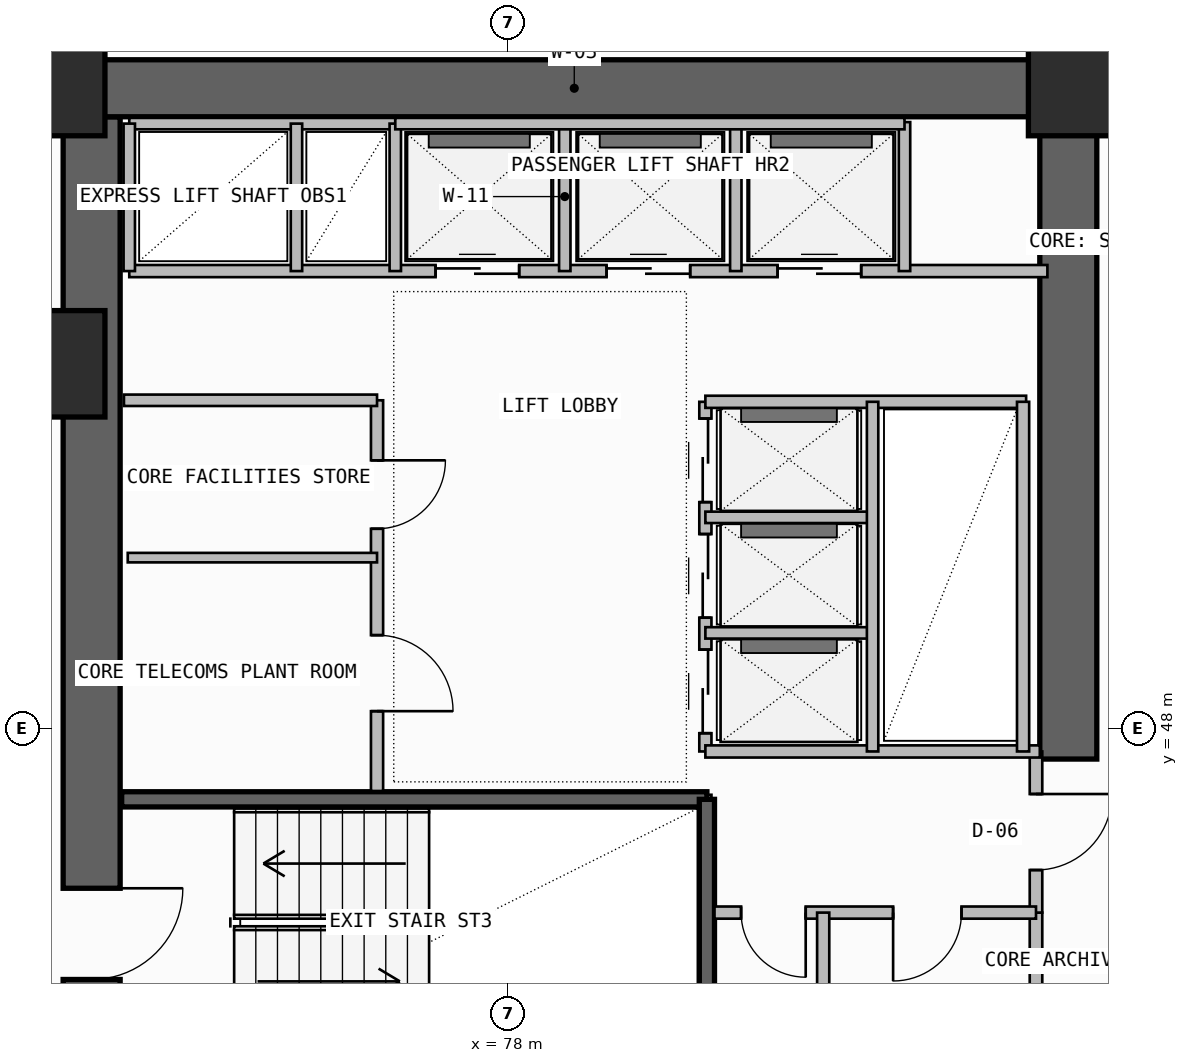
"""IFC4 building model, lengths in metres.
Left out: names, types, materials, properties, quantities, classifications, styles, units other than length and angle.
Written with IfcOpenShell. Run it as: python <this file> out.ifc"""

import sys

from ifc_helpers import new_model, si_unit, direction, frame, frame_2d, origin, origin_2d, place, context, subcontext, project, spatial, rectangle, extrude, element, fill, save


model = new_model("IFC4")
c1 = context("Model", 3, precision=1e-05, world=origin(), true_north=direction((0.0, 1.0)))
c2 = subcontext(c1, "Body", "Model", "MODEL_VIEW")
j1 = project(units=[si_unit("LENGTHUNIT", "METRE"), si_unit("PLANEANGLEUNIT", "RADIAN")], contexts=[c1])
p1 = place(None, origin())
s1 = spatial("IfcSite", under=j1, at=p1, CompositionType="ELEMENT")
p2 = place(p1, origin())
s2 = spatial("IfcBuilding", under=s1, at=p2, CompositionType="ELEMENT")
p3 = place(p2, frame((0.0, 0.0, 193.18)))
s3 = spatial("IfcBuildingStorey", under=s2, at=p3, CompositionType="ELEMENT", Elevation=193.18)
p4 = place(p3, frame((72.525, 43.35, -0.26), z_axis=(0.0, 0.0, 1.0), x_axis=(0.0, 1.0, 0.0)))
e1 = element("IfcWall", 1, at=p4, inside=s3, PredefinedType="SHEAR", context=c2, shape_type="SweptSolid", body=[
    extrude(rectangle(XDim=12.7, YDim=0.75, at=frame_2d((6.35, 0.0))), origin(), (0.0, 0.0, 1.0), 3.28),
])
p5 = place(p4, frame((1.35, 0.0, 0.26)))
e2 = element("IfcOpeningElement", 2, at=p5, cuts=e1, PredefinedType="OPENING", context=c2, shape_type="SweptSolid", body=[
    extrude(rectangle(XDim=1.2, YDim=2.2, at=frame_2d((0.6, 1.1))), frame((0.0, 0.385, 0.0), z_axis=(0.0, -1.0, 0.0), x_axis=(1.0, 0.0, 0.0)), (0.0, 0.0, 1.0), 0.77),
])
p6 = place(p3, frame((72.0, 56.425, -0.26), z_axis=(0.0, 0.0, 1.0), x_axis=(1.0, 0.0, 0.0)))
e3 = element("IfcWall", 3, at=p6, inside=s3, PredefinedType="SHEAR", context=c2, shape_type="SweptSolid", body=[
    extrude(rectangle(XDim=13.75, YDim=0.75, at=frame_2d((6.875, 0.0))), origin(), (0.0, 0.0, 1.0), 3.28),
])
p7 = place(p3, frame((85.375, 47.6, -0.26), z_axis=(0.0, 0.0, 1.0), x_axis=(0.0, 1.0, 0.0)))
e4 = element("IfcWall", 4, at=p7, inside=s3, PredefinedType="SHEAR", context=c2, shape_type="SweptSolid", body=[
    extrude(rectangle(XDim=8.45, YDim=0.75, at=frame_2d((4.225, 0.0))), origin(), (0.0, 0.0, 1.0), 3.28),
])
for number, where, z_axis, x_axis in (
    (5, (72.0, 52.8, 0.0), (0.0, 0.0, 1.0), (1.0, 0.0, 0.0)),
    (6, (72.0, 56.5, 0.0), (0.0, 0.0, 1.0), (1.0, 0.0, 0.0)),
    (7, (85.55, 56.5, 0.0), (0.0, 0.0, 1.0), (1.0, 0.0, 0.0)),
):
    element("IfcColumn", number, at=place(p3, frame(where, z_axis=z_axis, x_axis=x_axis)), inside=s3, PredefinedType="COLUMN", context=c2, shape_type="SweptSolid", body=[
        extrude(rectangle(XDim=1.4, YDim=1.4, at=origin_2d()), origin(), (0.0, 0.0, 1.0), 3.52),
    ])
p8 = place(p3, frame((72.92, 47.07, -0.26), z_axis=(0.0, 0.0, 1.0), x_axis=(1.0, 0.0, 0.0)))
e8 = element("IfcWall", 8, at=p8, inside=s3, PredefinedType="SOLIDWALL", context=c2, shape_type="SweptSolid", body=[
    extrude(rectangle(XDim=7.7, YDim=0.2, at=frame_2d((3.85, 0.0))), origin(), (0.0, 0.0, 1.0), 3.28),
])
p9 = place(p3, frame((80.62, 43.83, -0.26), z_axis=(0.0, 0.0, 1.0), x_axis=(0.0, 1.0, 0.0)))
e9 = element("IfcWall", 9, at=p9, inside=s3, PredefinedType="SOLIDWALL", context=c2, shape_type="SweptSolid", body=[
    extrude(rectangle(XDim=3.24, YDim=0.2, at=frame_2d((1.62, 0.0))), origin(), (0.0, 0.0, 1.0), 3.28),
])
p10 = place(p3, frame((84.95, 43.68, 0.0), z_axis=(0.0, 0.0, 1.0), x_axis=(0.0, 1.0, 0.0)))
e10 = element("IfcWall", 10, at=p10, inside=s3, PredefinedType="PLUMBINGWALL", context=c2, shape_type="SweptSolid", body=[
    extrude(rectangle(XDim=1.9, YDim=0.165, at=frame_2d((0.95, 0.0))), origin(), (0.0, 0.0, 1.0), 3.02),
])
p11 = place(p3, frame((84.95, 45.58, 0.0), z_axis=(0.0, 0.0, 1.0), x_axis=(0.0, 1.0, 0.0)))
e11 = element("IfcWall", 11, at=p11, inside=s3, PredefinedType="PARTITIONING", context=c2, shape_type="SweptSolid", body=[
    extrude(rectangle(XDim=2.12, YDim=0.165, at=frame_2d((1.06, 0.0))), origin(), (0.0, 0.0, 1.0), 3.02),
])
p12 = place(p11, frame((0.56, 0.0, 0.0)))
e12 = element("IfcOpeningElement", 12, at=p12, cuts=e11, PredefinedType="OPENING", context=c2, shape_type="SweptSolid", body=[
    extrude(rectangle(XDim=1.0, YDim=2.2, at=frame_2d((0.5, 1.1))), frame((0.0, 0.093, 0.0), z_axis=(0.0, -1.0, 0.0), x_axis=(1.0, 0.0, 0.0)), (0.0, 0.0, 1.0), 0.185),
])
p13 = place(p3, frame((80.72, 45.58, 0.0), z_axis=(0.0, 0.0, 1.0), x_axis=(1.0, 0.0, 0.0)))
e13 = element("IfcWall", 13, at=p13, inside=s3, PredefinedType="PLUMBINGWALL", context=c2, shape_type="SweptSolid", body=[
    extrude(rectangle(XDim=4.23, YDim=0.16, at=frame_2d((2.115, 0.0))), origin(), (0.0, 0.0, 1.0), 3.02),
])
p14 = place(p13, frame((0.35, 0.0, 0.0)))
e14 = element("IfcOpeningElement", 14, at=p14, cuts=e13, PredefinedType="OPENING", context=c2, shape_type="SweptSolid", body=[
    extrude(rectangle(XDim=0.85, YDim=2.05, at=frame_2d((0.425, 1.025))), frame((0.0, 0.09, 0.0), z_axis=(0.0, -1.0, 0.0), x_axis=(1.0, 0.0, 0.0)), (0.0, 0.0, 1.0), 0.18),
])
p15 = place(p13, frame((2.35, 0.0, 0.0)))
e15 = element("IfcOpeningElement", 15, at=p15, cuts=e13, PredefinedType="OPENING", context=c2, shape_type="SweptSolid", body=[
    extrude(rectangle(XDim=0.9, YDim=2.1, at=frame_2d((0.45, 1.05))), frame((0.0, 0.09, 0.0), z_axis=(0.0, -1.0, 0.0), x_axis=(1.0, 0.0, 0.0)), (0.0, 0.0, 1.0), 0.18),
])
p16 = place(p3, frame((82.15, 43.68, 0.0), z_axis=(0.0, 0.0, 1.0), x_axis=(0.0, 1.0, 0.0)))
e16 = element("IfcWall", 16, at=p16, inside=s3, PredefinedType="PLUMBINGWALL", context=c2, shape_type="SweptSolid", body=[
    extrude(rectangle(XDim=1.9, YDim=0.16, at=frame_2d((0.95, 0.0))), origin(), (0.0, 0.0, 1.0), 3.02),
])
p17 = place(p3, frame((76.28, 47.18, 0.0), z_axis=(0.0, 0.0, 1.0), x_axis=(0.0, 1.0, 0.0)))
e17 = element("IfcWall", 17, at=p17, inside=s3, PredefinedType="SOLIDWALL", context=c2, shape_type="SweptSolid", body=[
    extrude(rectangle(XDim=5.14, YDim=0.16, at=frame_2d((2.57, 0.0))), origin(), (0.0, 0.0, 1.0), 3.02),
])
p18 = place(p17, frame((1.05, 0.0, 0.0)))
e18 = element("IfcOpeningElement", 18, at=p18, cuts=e17, PredefinedType="OPENING", context=c2, shape_type="SweptSolid", body=[
    extrude(rectangle(XDim=1.0, YDim=2.2, at=frame_2d((0.5, 1.1))), frame((0.0, 0.09, 0.0), z_axis=(0.0, -1.0, 0.0), x_axis=(1.0, 0.0, 0.0)), (0.0, 0.0, 1.0), 0.18),
])
p19 = place(p17, frame((3.45, 0.0, 0.0)))
e19 = element("IfcOpeningElement", 19, at=p19, cuts=e17, PredefinedType="OPENING", context=c2, shape_type="SweptSolid", body=[
    extrude(rectangle(XDim=0.9, YDim=2.1, at=frame_2d((0.45, 1.05))), frame((0.0, 0.09, 0.0), z_axis=(0.0, -1.0, 0.0), x_axis=(1.0, 0.0, 0.0)), (0.0, 0.0, 1.0), 0.18),
])
p20 = place(p3, frame((72.95, 52.32, 0.0), z_axis=(0.0, 0.0, 1.0), x_axis=(1.0, 0.0, 0.0)))
e20 = element("IfcWall", 20, at=p20, inside=s3, PredefinedType="SOLIDWALL", context=c2, shape_type="SweptSolid", body=[
    extrude(rectangle(XDim=3.33, YDim=0.15, at=frame_2d((1.665, 0.0))), origin(), (0.0, 0.0, 1.0), 3.02),
])
p21 = place(p3, frame((73.0, 50.25, 0.0), z_axis=(0.0, 0.0, 1.0), x_axis=(1.0, 0.0, 0.0)))
e21 = element("IfcWall", 21, at=p21, inside=s3, PredefinedType="PARTITIONING", context=c2, shape_type="SweptSolid", body=[
    extrude(rectangle(XDim=3.28, YDim=0.125, at=frame_2d((1.64, 0.0))), origin(), (0.0, 0.0, 1.0), 3.02),
])
p22 = place(p3, frame((80.6, 47.7, 0.0), z_axis=(0.0, 0.0, 1.0), x_axis=(0.0, 1.0, 0.0)))
e22 = element("IfcWall", 22, at=p22, inside=s3, PredefinedType="SOLIDWALL", context=c2, shape_type="SweptSolid", body=[
    extrude(rectangle(XDim=4.6, YDim=0.16, at=frame_2d((2.3, 0.0))), origin(), (0.0, 0.0, 1.0), 3.02),
])
p23 = place(p22, frame((0.24, 0.0, 0.0)))
e23 = element("IfcOpeningElement", 23, at=p23, cuts=e22, PredefinedType="OPENING", context=c2, shape_type="SweptSolid", body=[
    extrude(rectangle(XDim=1.1, YDim=2.25, at=frame_2d((0.55, 1.125))), frame((0.0, 0.09, 0.0), z_axis=(0.0, -1.0, 0.0), x_axis=(1.0, 0.0, 0.0)), (0.0, 0.0, 1.0), 0.18),
])
p24 = place(p22, frame((1.76, 0.0, 0.0)))
e24 = element("IfcOpeningElement", 24, at=p24, cuts=e22, PredefinedType="OPENING", context=c2, shape_type="SweptSolid", body=[
    extrude(rectangle(XDim=1.1, YDim=2.25, at=frame_2d((0.55, 1.125))), frame((0.0, 0.09, 0.0), z_axis=(0.0, -1.0, 0.0), x_axis=(1.0, 0.0, 0.0)), (0.0, 0.0, 1.0), 0.18),
])
p25 = place(p22, frame((3.28, 0.0, 0.0)))
e25 = element("IfcOpeningElement", 25, at=p25, cuts=e22, PredefinedType="OPENING", context=c2, shape_type="SweptSolid", body=[
    extrude(rectangle(XDim=1.1, YDim=2.25, at=frame_2d((0.55, 1.125))), frame((0.0, 0.09, 0.0), z_axis=(0.0, -1.0, 0.0), x_axis=(1.0, 0.0, 0.0)), (0.0, 0.0, 1.0), 0.18),
])
p26 = place(p3, frame((80.6, 47.7, 0.0), z_axis=(0.0, 0.0, 1.0), x_axis=(1.0, 0.0, 0.0)))
e26 = element("IfcWall", 26, at=p26, inside=s3, PredefinedType="SOLIDWALL", context=c2, shape_type="SweptSolid", body=[
    extrude(rectangle(XDim=4.4, YDim=0.16, at=frame_2d((2.2, 0.0))), origin(), (0.0, 0.0, 1.0), 3.02),
])
p27 = place(p3, frame((80.6, 52.3, 0.0), z_axis=(0.0, 0.0, 1.0), x_axis=(1.0, 0.0, 0.0)))
e27 = element("IfcWall", 27, at=p27, inside=s3, PredefinedType="SOLIDWALL", context=c2, shape_type="SweptSolid", body=[
    extrude(rectangle(XDim=4.22, YDim=0.16, at=frame_2d((2.11, 0.0))), origin(), (0.0, 0.0, 1.0), 3.02),
])
for number, where, z_axis, x_axis in (
    (28, (80.6, 49.26, 0.0), (0.0, 0.0, 1.0), (1.0, 0.0, 0.0)),
    (29, (80.6, 50.78, 0.0), (0.0, 0.0, 1.0), (1.0, 0.0, 0.0)),
):
    element("IfcWall", number, at=place(p3, frame(where, z_axis=z_axis, x_axis=x_axis)), inside=s3, PredefinedType="PLUMBINGWALL", context=c2, shape_type="SweptSolid", body=[
        extrude(rectangle(XDim=2.2, YDim=0.15, at=frame_2d((1.1, 0.0))), origin(), (0.0, 0.0, 1.0), 3.02),
    ])
p28 = place(p3, frame((82.8, 47.7, 0.0), z_axis=(0.0, 0.0, 1.0), x_axis=(0.0, 1.0, 0.0)))
e30 = element("IfcWall", 30, at=p28, inside=s3, PredefinedType="PLUMBINGWALL", context=c2, shape_type="SweptSolid", body=[
    extrude(rectangle(XDim=4.6, YDim=0.15, at=frame_2d((2.3, 0.0))), origin(), (0.0, 0.0, 1.0), 3.02),
])
p29 = place(p3, frame((84.78, 47.7, 0.0), z_axis=(0.0, 0.0, 1.0), x_axis=(0.0, 1.0, 0.0)))
e31 = element("IfcWall", 31, at=p29, inside=s3, PredefinedType="SOLIDWALL", context=c2, shape_type="SweptSolid", body=[
    extrude(rectangle(XDim=4.6, YDim=0.16, at=frame_2d((2.3, 0.0))), origin(), (0.0, 0.0, 1.0), 3.02),
])
p30 = place(p3, frame((73.02, 54.02, 0.0), z_axis=(0.0, 0.0, 1.0), x_axis=(1.0, 0.0, 0.0)))
e32 = element("IfcWall", 32, at=p30, inside=s3, PredefinedType="SOLIDWALL", context=c2, shape_type="SweptSolid", body=[
    extrude(rectangle(XDim=12.08, YDim=0.16, at=frame_2d((6.04, 0.0))), origin(), (0.0, 0.0, 1.0), 3.02),
])
p31 = place(p30, frame((4.03, 0.0, 0.0)))
e33 = element("IfcOpeningElement", 33, at=p31, cuts=e32, PredefinedType="OPENING", context=c2, shape_type="SweptSolid", body=[
    extrude(rectangle(XDim=1.1, YDim=2.25, at=frame_2d((0.55, 1.125))), frame((0.0, 0.09, 0.0), z_axis=(0.0, -1.0, 0.0), x_axis=(1.0, 0.0, 0.0)), (0.0, 0.0, 1.0), 0.18),
])
p32 = place(p30, frame((6.28, 0.0, 0.0)))
e34 = element("IfcOpeningElement", 34, at=p32, cuts=e32, PredefinedType="OPENING", context=c2, shape_type="SweptSolid", body=[
    extrude(rectangle(XDim=1.1, YDim=2.25, at=frame_2d((0.55, 1.125))), frame((0.0, 0.09, 0.0), z_axis=(0.0, -1.0, 0.0), x_axis=(1.0, 0.0, 0.0)), (0.0, 0.0, 1.0), 0.18),
])
p33 = place(p30, frame((8.53, 0.0, 0.0)))
e35 = element("IfcOpeningElement", 35, at=p33, cuts=e32, PredefinedType="OPENING", context=c2, shape_type="SweptSolid", body=[
    extrude(rectangle(XDim=1.1, YDim=2.25, at=frame_2d((0.55, 1.125))), frame((0.0, 0.09, 0.0), z_axis=(0.0, -1.0, 0.0), x_axis=(1.0, 0.0, 0.0)), (0.0, 0.0, 1.0), 0.18),
])
p34 = place(p3, frame((73.02, 55.96, 0.0), z_axis=(0.0, 0.0, 1.0), x_axis=(1.0, 0.0, 0.0)))
e36 = element("IfcWall", 36, at=p34, inside=s3, PredefinedType="SOLIDWALL", context=c2, shape_type="SweptSolid", body=[
    extrude(rectangle(XDim=3.5, YDim=0.15, at=frame_2d((1.75, 0.0))), origin(), (0.0, 0.0, 1.0), 3.02),
])
p35 = place(p3, frame((73.02, 54.02, 0.0), z_axis=(0.0, 0.0, 1.0), x_axis=(0.0, 1.0, 0.0)))
e37 = element("IfcWall", 37, at=p35, inside=s3, PredefinedType="PLUMBINGWALL", context=c2, shape_type="SweptSolid", body=[
    extrude(rectangle(XDim=1.94, YDim=0.15, at=frame_2d((0.97, 0.0))), origin(), (0.0, 0.0, 1.0), 3.02),
])
p36 = place(p3, frame((76.52, 54.02, 0.0), z_axis=(0.0, 0.0, 1.0), x_axis=(0.0, 1.0, 0.0)))
e38 = element("IfcWall", 38, at=p36, inside=s3, PredefinedType="SOLIDWALL", context=c2, shape_type="SweptSolid", body=[
    extrude(rectangle(XDim=1.94, YDim=0.15, at=frame_2d((0.97, 0.0))), origin(), (0.0, 0.0, 1.0), 3.02),
])
p37 = place(p3, frame((75.22, 54.02, 0.0), z_axis=(0.0, 0.0, 1.0), x_axis=(0.0, 1.0, 0.0)))
e39 = element("IfcWall", 39, at=p37, inside=s3, PredefinedType="PLUMBINGWALL", context=c2, shape_type="SweptSolid", body=[
    extrude(rectangle(XDim=1.94, YDim=0.15, at=frame_2d((0.97, 0.0))), origin(), (0.0, 0.0, 1.0), 3.02),
])
for number, where, z_axis, x_axis in (
    (40, (78.75, 54.02, 0.0), (0.0, 0.0, 1.0), (0.0, 1.0, 0.0)),
    (41, (81.0, 54.02, 0.0), (0.0, 0.0, 1.0), (0.0, 1.0, 0.0)),
):
    element("IfcWall", number, at=place(p3, frame(where, z_axis=z_axis, x_axis=x_axis)), inside=s3, PredefinedType="PLUMBINGWALL", context=c2, shape_type="SweptSolid", body=[
        extrude(rectangle(XDim=1.96, YDim=0.15, at=frame_2d((0.98, 0.0))), origin(), (0.0, 0.0, 1.0), 3.02),
    ])
p38 = place(p3, frame((83.22, 54.02, 0.0), z_axis=(0.0, 0.0, 1.0), x_axis=(0.0, 1.0, 0.0)))
e42 = element("IfcWall", 42, at=p38, inside=s3, PredefinedType="SOLIDWALL", context=c2, shape_type="SweptSolid", body=[
    extrude(rectangle(XDim=1.96, YDim=0.15, at=frame_2d((0.98, 0.0))), origin(), (0.0, 0.0, 1.0), 3.02),
])
p39 = place(p3, frame((76.52, 55.96, 0.0), z_axis=(0.0, 0.0, 1.0), x_axis=(1.0, 0.0, 0.0)))
e43 = element("IfcWall", 43, at=p39, inside=s3, PredefinedType="SOLIDWALL", context=c2, shape_type="SweptSolid", body=[
    extrude(rectangle(XDim=6.7, YDim=0.15, at=frame_2d((3.35, 0.0))), origin(), (0.0, 0.0, 1.0), 3.02),
])
p40 = place(p5, frame((1.2, 0.0, 0.0), z_axis=(0.0, 0.0, 1.0), x_axis=(-1.0, 0.0, 0.0)))
e44 = element("IfcDoor", 44, at=p40, inside=s3, OperationType="SINGLE_SWING_LEFT", PredefinedType="USERDEFINED", context=c2, shape_type="SweptSolid", body=[
    extrude(rectangle(XDim=1.2, YDim=2.2, at=frame_2d((0.6, 1.1))), frame((0.0, 0.025, 0.0), z_axis=(0.0, -1.0, 0.0), x_axis=(1.0, 0.0, 0.0)), (0.0, 0.0, 1.0), 0.05),
])
fill(e2, e44)
p41 = place(p12, frame((1.0, 0.0, 0.0), z_axis=(0.0, 0.0, 1.0), x_axis=(-1.0, 0.0, 0.0)))
e45 = element("IfcDoor", 45, at=p41, inside=s3, OperationType="SINGLE_SWING_LEFT", PredefinedType="DOOR", context=c2, shape_type="SweptSolid", body=[
    extrude(rectangle(XDim=1.0, YDim=2.2, at=frame_2d((0.5, 1.1))), frame((0.0, 0.025, 0.0), z_axis=(0.0, -1.0, 0.0), x_axis=(1.0, 0.0, 0.0)), (0.0, 0.0, 1.0), 0.05),
])
fill(e12, e45)
p42 = place(p14, frame((0.85, 0.0, 0.0), z_axis=(0.0, 0.0, 1.0), x_axis=(-1.0, 0.0, 0.0)))
e46 = element("IfcDoor", 46, at=p42, inside=s3, OperationType="SINGLE_SWING_LEFT", PredefinedType="DOOR", context=c2, shape_type="SweptSolid", body=[
    extrude(rectangle(XDim=0.85, YDim=2.05, at=frame_2d((0.425, 1.025))), frame((0.0, 0.025, 0.0), z_axis=(0.0, -1.0, 0.0), x_axis=(1.0, 0.0, 0.0)), (0.0, 0.0, 1.0), 0.05),
])
fill(e14, e46)
p43 = place(p15, frame((0.9, 0.0, 0.0), z_axis=(0.0, 0.0, 1.0), x_axis=(-1.0, 0.0, 0.0)))
e47 = element("IfcDoor", 47, at=p43, inside=s3, OperationType="SINGLE_SWING_RIGHT", PredefinedType="DOOR", context=c2, shape_type="SweptSolid", body=[
    extrude(rectangle(XDim=0.9, YDim=2.1, at=frame_2d((0.45, 1.05))), frame((0.0, 0.025, 0.0), z_axis=(0.0, -1.0, 0.0), x_axis=(1.0, 0.0, 0.0)), (0.0, 0.0, 1.0), 0.05),
])
fill(e15, e47)
p44 = place(p18, frame((1.0, 0.0, 0.0), z_axis=(0.0, 0.0, 1.0), x_axis=(-1.0, 0.0, 0.0)))
e48 = element("IfcDoor", 48, at=p44, inside=s3, OperationType="SINGLE_SWING_RIGHT", PredefinedType="DOOR", context=c2, shape_type="SweptSolid", body=[
    extrude(rectangle(XDim=1.0, YDim=2.2, at=frame_2d((0.5, 1.1))), frame((0.0, 0.025, 0.0), z_axis=(0.0, -1.0, 0.0), x_axis=(1.0, 0.0, 0.0)), (0.0, 0.0, 1.0), 0.05),
])
fill(e18, e48)
p45 = place(p19, frame((0.9, 0.0, 0.0), z_axis=(0.0, 0.0, 1.0), x_axis=(-1.0, 0.0, 0.0)))
e49 = element("IfcDoor", 49, at=p45, inside=s3, OperationType="SINGLE_SWING_LEFT", PredefinedType="DOOR", context=c2, shape_type="SweptSolid", body=[
    extrude(rectangle(XDim=0.9, YDim=2.1, at=frame_2d((0.45, 1.05))), frame((0.0, 0.025, 0.0), z_axis=(0.0, -1.0, 0.0), x_axis=(1.0, 0.0, 0.0)), (0.0, 0.0, 1.0), 0.05),
])
fill(e19, e49)
p46 = place(p23, frame((1.1, 0.0, 0.0), z_axis=(0.0, 0.0, 1.0), x_axis=(-1.0, 0.0, 0.0)))
e50 = element("IfcDoor", 50, at=p46, inside=s3, OperationType="DOUBLE_DOOR_SLIDING", PredefinedType="DOOR", context=c2, shape_type="SweptSolid", body=[
    extrude(rectangle(XDim=1.1, YDim=2.25, at=frame_2d((0.55, 1.125))), frame((0.0, 0.025, 0.0), z_axis=(0.0, -1.0, 0.0), x_axis=(1.0, 0.0, 0.0)), (0.0, 0.0, 1.0), 0.05),
])
fill(e23, e50)
p47 = place(p24, frame((1.1, 0.0, 0.0), z_axis=(0.0, 0.0, 1.0), x_axis=(-1.0, 0.0, 0.0)))
e51 = element("IfcDoor", 51, at=p47, inside=s3, OperationType="DOUBLE_DOOR_SLIDING", PredefinedType="DOOR", context=c2, shape_type="SweptSolid", body=[
    extrude(rectangle(XDim=1.1, YDim=2.25, at=frame_2d((0.55, 1.125))), frame((0.0, 0.025, 0.0), z_axis=(0.0, -1.0, 0.0), x_axis=(1.0, 0.0, 0.0)), (0.0, 0.0, 1.0), 0.05),
])
fill(e24, e51)
p48 = place(p25, frame((1.1, 0.0, 0.0), z_axis=(0.0, 0.0, 1.0), x_axis=(-1.0, 0.0, 0.0)))
e52 = element("IfcDoor", 52, at=p48, inside=s3, OperationType="DOUBLE_DOOR_SLIDING", PredefinedType="DOOR", context=c2, shape_type="SweptSolid", body=[
    extrude(rectangle(XDim=1.1, YDim=2.25, at=frame_2d((0.55, 1.125))), frame((0.0, 0.025, 0.0), z_axis=(0.0, -1.0, 0.0), x_axis=(1.0, 0.0, 0.0)), (0.0, 0.0, 1.0), 0.05),
])
fill(e25, e52)
p49 = place(p31, origin())
e53 = element("IfcDoor", 53, at=p49, inside=s3, OperationType="DOUBLE_DOOR_SLIDING", PredefinedType="DOOR", context=c2, shape_type="SweptSolid", body=[
    extrude(rectangle(XDim=1.1, YDim=2.25, at=frame_2d((0.55, 1.125))), frame((0.0, 0.025, 0.0), z_axis=(0.0, -1.0, 0.0), x_axis=(1.0, 0.0, 0.0)), (0.0, 0.0, 1.0), 0.05),
])
fill(e33, e53)
p50 = place(p32, origin())
e54 = element("IfcDoor", 54, at=p50, inside=s3, OperationType="DOUBLE_DOOR_SLIDING", PredefinedType="DOOR", context=c2, shape_type="SweptSolid", body=[
    extrude(rectangle(XDim=1.1, YDim=2.25, at=frame_2d((0.55, 1.125))), frame((0.0, 0.025, 0.0), z_axis=(0.0, -1.0, 0.0), x_axis=(1.0, 0.0, 0.0)), (0.0, 0.0, 1.0), 0.05),
])
fill(e34, e54)
p51 = place(p33, origin())
e55 = element("IfcDoor", 55, at=p51, inside=s3, OperationType="DOUBLE_DOOR_SLIDING", PredefinedType="DOOR", context=c2, shape_type="SweptSolid", body=[
    extrude(rectangle(XDim=1.1, YDim=2.25, at=frame_2d((0.55, 1.125))), frame((0.0, 0.025, 0.0), z_axis=(0.0, -1.0, 0.0), x_axis=(1.0, 0.0, 0.0)), (0.0, 0.0, 1.0), 0.05),
])
fill(e35, e55)
save(model, sys.argv[1])
